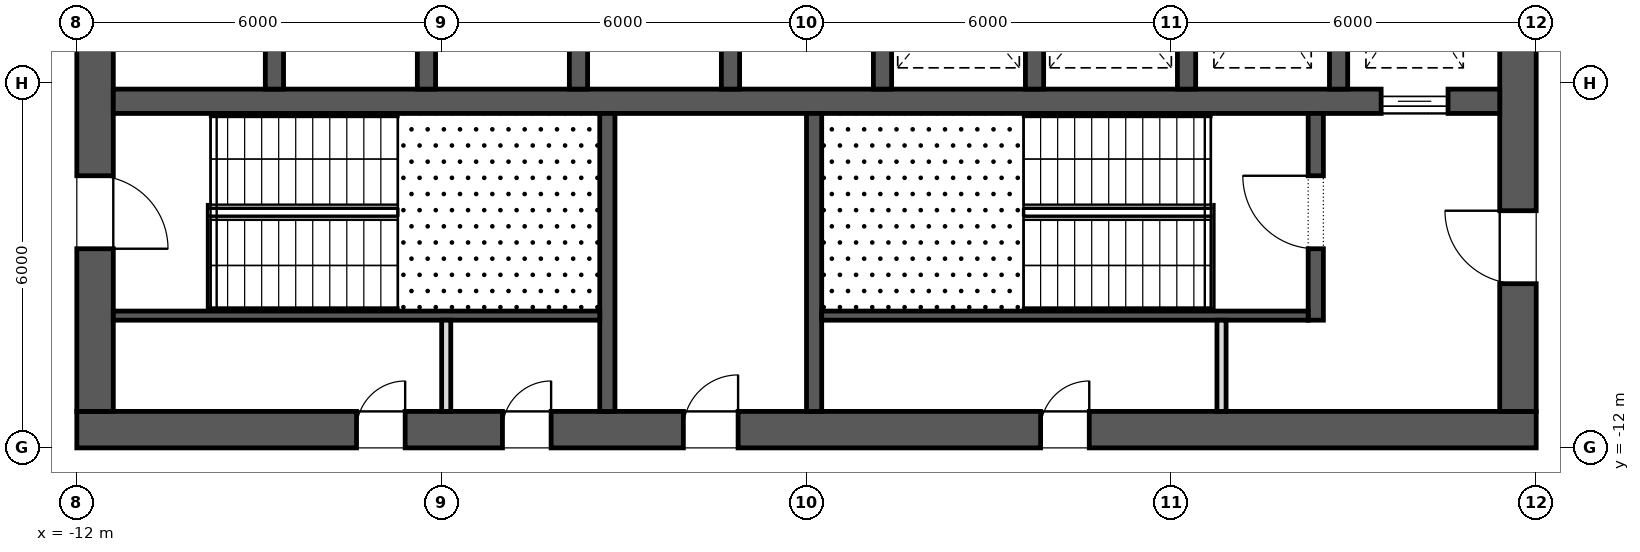
"""IFC4 building model, lengths in metres.
Left out: names, types, materials, properties, quantities, classifications, styles, units other than length and angle.
Written with IfcOpenShell. Run it as: python <this file> out.ifc"""

import sys

from ifc_helpers import new_model, si_unit, direction, frame, frame_2d, origin, place, context, subcontext, project, spatial, rectangle, extrude, element, fill, save


model = new_model("IFC4")
c1 = context("Model", 3, precision=1e-05, world=origin(), true_north=direction((0.0, 1.0)))
c2 = subcontext(c1, "Body", "Model", "MODEL_VIEW")
j1 = project(units=[si_unit("LENGTHUNIT", "METRE"), si_unit("PLANEANGLEUNIT", "RADIAN")], contexts=[c1])
p1 = place(None, origin())
s1 = spatial("IfcSite", under=j1, at=p1, CompositionType="ELEMENT")
p2 = place(p1, origin())
s2 = spatial("IfcBuilding", under=s1, at=p2, CompositionType="ELEMENT")
p3 = place(p2, frame((0.0, 0.0, 73.9)))
s3 = spatial("IfcBuildingStorey", under=s2, at=p3, CompositionType="ELEMENT", Elevation=73.9)
p4 = place(p3, frame((-12.0, -11.7, 0.0), z_axis=(0.0, 0.0, 1.0), x_axis=(1.0, 0.0, 0.0)))
e1 = element("IfcWall", 1, at=p4, inside=s3, PredefinedType="SHEAR", context=c2, shape_type="SweptSolid", body=[
    extrude(rectangle(XDim=24.0, YDim=0.6, at=frame_2d((12.0, 0.0))), origin(), (0.0, 0.0, 1.0), 4.2),
])
p5 = place(p4, frame((9.975, 0.0, 0.0)))
e2 = element("IfcOpeningElement", 2, at=p5, cuts=e1, PredefinedType="OPENING", context=c2, shape_type="SweptSolid", body=[
    extrude(rectangle(XDim=0.9, YDim=2.1, at=frame_2d((0.45, 1.05))), frame((0.0, 0.312, 0.0), z_axis=(0.0, -1.0, 0.0), x_axis=(1.0, 0.0, 0.0)), (0.0, 0.0, 1.0), 0.624),
])
p6 = place(p4, frame((4.6, 0.0, 0.0)))
e3 = element("IfcOpeningElement", 3, at=p6, cuts=e1, PredefinedType="OPENING", context=c2, shape_type="SweptSolid", body=[
    extrude(rectangle(XDim=0.8, YDim=2.1, at=frame_2d((0.4, 1.05))), frame((0.0, 0.312, 0.0), z_axis=(0.0, -1.0, 0.0), x_axis=(1.0, 0.0, 0.0)), (0.0, 0.0, 1.0), 0.624),
])
p7 = place(p4, frame((7.0, 0.0, 0.0)))
e4 = element("IfcOpeningElement", 4, at=p7, cuts=e1, PredefinedType="OPENING", context=c2, shape_type="SweptSolid", body=[
    extrude(rectangle(XDim=0.8, YDim=2.1, at=frame_2d((0.4, 1.05))), frame((0.0, 0.312, 0.0), z_axis=(0.0, -1.0, 0.0), x_axis=(1.0, 0.0, 0.0)), (0.0, 0.0, 1.0), 0.624),
])
p8 = place(p4, frame((15.85, 0.0, 0.0)))
e5 = element("IfcOpeningElement", 5, at=p8, cuts=e1, PredefinedType="OPENING", context=c2, shape_type="SweptSolid", body=[
    extrude(rectangle(XDim=0.8, YDim=2.1, at=frame_2d((0.4, 1.05))), frame((0.0, 0.312, 0.0), z_axis=(0.0, -1.0, 0.0), x_axis=(1.0, 0.0, 0.0)), (0.0, 0.0, 1.0), 0.624),
])
p9 = place(p3, frame((11.7, -11.4, 0.0), z_axis=(0.0, 0.0, 1.0), x_axis=(0.0, 1.0, 0.0)))
e6 = element("IfcWall", 6, at=p9, inside=s3, PredefinedType="SHEAR", context=c2, shape_type="SweptSolid", body=[
    extrude(rectangle(XDim=22.8, YDim=0.6, at=frame_2d((11.4, 0.0))), origin(), (0.0, 0.0, 1.0), 4.2),
])
p10 = place(p9, frame((10.2, 0.0, 0.0)))
e7 = element("IfcOpeningElement", 7, at=p10, cuts=e6, PredefinedType="OPENING", context=c2, shape_type="SweptSolid", body=[
    extrude(rectangle(XDim=2.4, YDim=2.1, at=frame_2d((1.2, 1.05))), frame((0.0, 0.312, 0.0), z_axis=(0.0, -1.0, 0.0), x_axis=(1.0, 0.0, 0.0)), (0.0, 0.0, 1.0), 0.624),
])
p11 = place(p9, frame((19.5, 0.0, 0.0)))
e8 = element("IfcOpeningElement", 8, at=p11, cuts=e6, PredefinedType="OPENING", context=c2, shape_type="SweptSolid", body=[
    extrude(rectangle(XDim=1.2, YDim=2.1, at=frame_2d((0.6, 1.05))), frame((0.0, 0.312, 0.0), z_axis=(0.0, -1.0, 0.0), x_axis=(1.0, 0.0, 0.0)), (0.0, 0.0, 1.0), 0.624),
])
p12 = place(p9, frame((2.1, 0.0, 0.0)))
e9 = element("IfcOpeningElement", 9, at=p12, cuts=e6, PredefinedType="OPENING", context=c2, shape_type="SweptSolid", body=[
    extrude(rectangle(XDim=1.2, YDim=2.1, at=frame_2d((0.6, 1.05))), frame((0.0, 0.312, 0.0), z_axis=(0.0, -1.0, 0.0), x_axis=(1.0, 0.0, 0.0)), (0.0, 0.0, 1.0), 0.624),
])
p13 = place(p3, frame((-11.7, -11.4, 0.0), z_axis=(0.0, 0.0, 1.0), x_axis=(0.0, 1.0, 0.0)))
e10 = element("IfcWall", 10, at=p13, inside=s3, PredefinedType="SHEAR", context=c2, shape_type="SweptSolid", body=[
    extrude(rectangle(XDim=22.8, YDim=0.6, at=frame_2d((11.4, 0.0))), origin(), (0.0, 0.0, 1.0), 4.2),
])
p14 = place(p13, frame((10.2, 0.0, 0.0)))
e11 = element("IfcOpeningElement", 11, at=p14, cuts=e10, PredefinedType="OPENING", context=c2, shape_type="SweptSolid", body=[
    extrude(rectangle(XDim=2.4, YDim=2.1, at=frame_2d((1.2, 1.05))), frame((0.0, 0.312, 0.0), z_axis=(0.0, -1.0, 0.0), x_axis=(1.0, 0.0, 0.0)), (0.0, 0.0, 1.0), 0.624),
])
p15 = place(p13, frame((18.925, 0.0, 0.0)))
e12 = element("IfcOpeningElement", 12, at=p15, cuts=e10, PredefinedType="OPENING", context=c2, shape_type="SweptSolid", body=[
    extrude(rectangle(XDim=1.2, YDim=2.1, at=frame_2d((0.6, 1.05))), frame((0.0, 0.312, 0.0), z_axis=(0.0, -1.0, 0.0), x_axis=(1.0, 0.0, 0.0)), (0.0, 0.0, 1.0), 0.624),
])
p16 = place(p13, frame((2.675, 0.0, 0.0)))
e13 = element("IfcOpeningElement", 13, at=p16, cuts=e10, PredefinedType="OPENING", context=c2, shape_type="SweptSolid", body=[
    extrude(rectangle(XDim=1.2, YDim=2.1, at=frame_2d((0.6, 1.05))), frame((0.0, 0.312, 0.0), z_axis=(0.0, -1.0, 0.0), x_axis=(1.0, 0.0, 0.0)), (0.0, 0.0, 1.0), 0.624),
])
p17 = place(p3, frame((-11.4, -6.3, 0.0), z_axis=(0.0, 0.0, 1.0), x_axis=(1.0, 0.0, 0.0)))
e14 = element("IfcWall", 14, at=p17, inside=s3, PredefinedType="SHEAR", context=c2, shape_type="SweptSolid", body=[
    extrude(rectangle(XDim=22.8, YDim=0.4, at=frame_2d((11.4, 0.0))), origin(), (0.0, 0.0, 1.0), 4.2),
])
p18 = place(p17, frame((20.85, 0.0, 0.0)))
e15 = element("IfcOpeningElement", 15, at=p18, cuts=e14, PredefinedType="OPENING", context=c2, shape_type="SweptSolid", body=[
    extrude(rectangle(XDim=1.1, YDim=2.1, at=frame_2d((0.55, 1.05))), frame((0.0, 0.212, 0.0), z_axis=(0.0, -1.0, 0.0), x_axis=(1.0, 0.0, 0.0)), (0.0, 0.0, 1.0), 0.424),
])
for number, where, z_axis, x_axis in (
    (16, (-8.75, -6.1, 0.0), (0.0, 0.0, 1.0), (0.0, 1.0, 0.0)),
    (17, (-6.25, -6.1, 0.0), (0.0, 0.0, 1.0), (0.0, 1.0, 0.0)),
    (18, (-3.75, -6.1, 0.0), (0.0, 0.0, 1.0), (0.0, 1.0, 0.0)),
    (19, (-1.25, -6.1, 0.0), (0.0, 0.0, 1.0), (0.0, 1.0, 0.0)),
    (20, (1.25, -6.1, 0.0), (0.0, 0.0, 1.0), (0.0, 1.0, 0.0)),
    (21, (3.75, -6.1, 0.0), (0.0, 0.0, 1.0), (0.0, 1.0, 0.0)),
    (22, (6.25, -6.1, 0.0), (0.0, 0.0, 1.0), (0.0, 1.0, 0.0)),
    (23, (8.75, -6.1, 0.0), (0.0, 0.0, 1.0), (0.0, 1.0, 0.0)),
):
    element("IfcWall", number, at=place(p3, frame(where, z_axis=z_axis, x_axis=x_axis)), inside=s3, PredefinedType="SHEAR", context=c2, shape_type="SweptSolid", body=[
        extrude(rectangle(XDim=2.9, YDim=0.3, at=frame_2d((1.45, 0.0))), origin(), (0.0, 0.0, 1.0), 4.2),
    ])
for number, where, z_axis, x_axis in (
    (24, (-3.275, -11.4, 0.0), (0.0, 0.0, 1.0), (0.0, 1.0, 0.0)),
    (25, (0.125, -11.4, 0.0), (0.0, 0.0, 1.0), (0.0, 1.0, 0.0)),
):
    element("IfcWall", number, at=place(p3, frame(where, z_axis=z_axis, x_axis=x_axis)), inside=s3, PredefinedType="SHEAR", context=c2, shape_type="SweptSolid", body=[
        extrude(rectangle(XDim=4.9, YDim=0.25, at=frame_2d((2.45, 0.0))), origin(), (0.0, 0.0, 1.0), 3.9),
    ])
p19 = place(p3, frame((8.375, -9.9, 0.0), z_axis=(0.0, 0.0, 1.0), x_axis=(0.0, 1.0, 0.0)))
e26 = element("IfcWall", 26, at=p19, inside=s3, PredefinedType="SHEAR", context=c2, shape_type="SweptSolid", body=[
    extrude(rectangle(XDim=3.4, YDim=0.25, at=frame_2d((1.7, 0.0))), origin(), (0.0, 0.0, 1.0), 3.9),
])
p20 = place(p19, frame((1.175, 0.0, 0.0)))
e27 = element("IfcOpeningElement", 27, at=p20, cuts=e26, PredefinedType="OPENING", context=c2, shape_type="SweptSolid", body=[
    extrude(rectangle(XDim=1.2, YDim=2.1, at=frame_2d((0.6, 1.05))), frame((0.0, 0.137, 0.0), z_axis=(0.0, -1.0, 0.0), x_axis=(1.0, 0.0, 0.0)), (0.0, 0.0, 1.0), 0.274),
])
for number, where, z_axis, x_axis in (
    (28, (-11.4, -9.825, 0.0), (0.0, 0.0, 1.0), (1.0, 0.0, 0.0)),
    (29, (0.25, -9.825, 0.0), (0.0, 0.0, 1.0), (1.0, 0.0, 0.0)),
):
    element("IfcWall", number, at=place(p3, frame(where, z_axis=z_axis, x_axis=x_axis)), inside=s3, PredefinedType="SHEAR", context=c2, shape_type="SweptSolid", body=[
        extrude(rectangle(XDim=8.0, YDim=0.15, at=frame_2d((4.0, 0.0))), origin(), (0.0, 0.0, 1.0), 3.9),
    ])
for number, where, z_axis, x_axis in (
    (30, (-5.925, -11.4, 0.0), (0.0, 0.0, 1.0), (0.0, 1.0, 0.0)),
    (31, (6.825, -11.4, 0.0), (0.0, 0.0, 1.0), (0.0, 1.0, 0.0)),
):
    element("IfcWall", number, at=place(p3, frame(where, z_axis=z_axis, x_axis=x_axis)), inside=s3, PredefinedType="PARTITIONING", context=c2, shape_type="SweptSolid", body=[
        extrude(rectangle(XDim=1.5, YDim=0.15, at=frame_2d((0.75, 0.0))), origin(), (0.0, 0.0, 1.0), 3.9),
    ])
p21 = place(p18, origin())
e32 = element("IfcDoor", 32, at=p21, inside=s3, OperationType="SLIDING_TO_LEFT", PredefinedType="DOOR", context=c2, shape_type="SweptSolid", body=[
    extrude(rectangle(XDim=1.1, YDim=2.1, at=frame_2d((0.55, 1.05))), frame((0.0, 0.025, 0.0), z_axis=(0.0, -1.0, 0.0), x_axis=(1.0, 0.0, 0.0)), (0.0, 0.0, 1.0), 0.05),
])
fill(e15, e32)
p22 = place(p16, frame((1.2, 0.0, 0.0), z_axis=(0.0, 0.0, 1.0), x_axis=(-1.0, 0.0, 0.0)))
e33 = element("IfcDoor", 33, at=p22, inside=s3, OperationType="SINGLE_SWING_LEFT", PredefinedType="DOOR", context=c2, shape_type="SweptSolid", body=[
    extrude(rectangle(XDim=1.2, YDim=2.1, at=frame_2d((0.6, 1.05))), frame((0.0, 0.025, 0.0), z_axis=(0.0, -1.0, 0.0), x_axis=(1.0, 0.0, 0.0)), (0.0, 0.0, 1.0), 0.05),
])
fill(e13, e33)
p23 = place(p20, origin())
e34 = element("IfcDoor", 34, at=p23, inside=s3, OperationType="SINGLE_SWING_LEFT", PredefinedType="DOOR", context=c2, shape_type="SweptSolid", body=[
    extrude(rectangle(XDim=1.2, YDim=2.1, at=frame_2d((0.6, 1.05))), frame((0.0, 0.025, 0.0), z_axis=(0.0, -1.0, 0.0), x_axis=(1.0, 0.0, 0.0)), (0.0, 0.0, 1.0), 0.05),
])
fill(e27, e34)
p24 = place(p12, origin())
e35 = element("IfcDoor", 35, at=p24, inside=s3, OperationType="SINGLE_SWING_LEFT", PredefinedType="DOOR", context=c2, shape_type="SweptSolid", body=[
    extrude(rectangle(XDim=1.2, YDim=2.1, at=frame_2d((0.6, 1.05))), frame((0.0, 0.025, 0.0), z_axis=(0.0, -1.0, 0.0), x_axis=(1.0, 0.0, 0.0)), (0.0, 0.0, 1.0), 0.05),
])
fill(e9, e35)
p25 = place(p5, origin())
e36 = element("IfcDoor", 36, at=p25, inside=s3, OperationType="SINGLE_SWING_LEFT", PredefinedType="DOOR", context=c2, shape_type="SweptSolid", body=[
    extrude(rectangle(XDim=0.9, YDim=2.1, at=frame_2d((0.45, 1.05))), frame((0.0, 0.025, 0.0), z_axis=(0.0, -1.0, 0.0), x_axis=(1.0, 0.0, 0.0)), (0.0, 0.0, 1.0), 0.05),
])
fill(e2, e36)
p26 = place(p6, origin())
e37 = element("IfcDoor", 37, at=p26, inside=s3, OperationType="SINGLE_SWING_LEFT", PredefinedType="DOOR", context=c2, shape_type="SweptSolid", body=[
    extrude(rectangle(XDim=0.8, YDim=2.1, at=frame_2d((0.4, 1.05))), frame((0.0, 0.025, 0.0), z_axis=(0.0, -1.0, 0.0), x_axis=(1.0, 0.0, 0.0)), (0.0, 0.0, 1.0), 0.05),
])
fill(e3, e37)
p27 = place(p7, origin())
e38 = element("IfcDoor", 38, at=p27, inside=s3, OperationType="SINGLE_SWING_LEFT", PredefinedType="DOOR", context=c2, shape_type="SweptSolid", body=[
    extrude(rectangle(XDim=0.8, YDim=2.1, at=frame_2d((0.4, 1.05))), frame((0.0, 0.025, 0.0), z_axis=(0.0, -1.0, 0.0), x_axis=(1.0, 0.0, 0.0)), (0.0, 0.0, 1.0), 0.05),
])
fill(e4, e38)
p28 = place(p8, origin())
e39 = element("IfcDoor", 39, at=p28, inside=s3, OperationType="SINGLE_SWING_LEFT", PredefinedType="DOOR", context=c2, shape_type="SweptSolid", body=[
    extrude(rectangle(XDim=0.8, YDim=2.1, at=frame_2d((0.4, 1.05))), frame((0.0, 0.025, 0.0), z_axis=(0.0, -1.0, 0.0), x_axis=(1.0, 0.0, 0.0)), (0.0, 0.0, 1.0), 0.05),
])
fill(e5, e39)
save(model, sys.argv[1])
